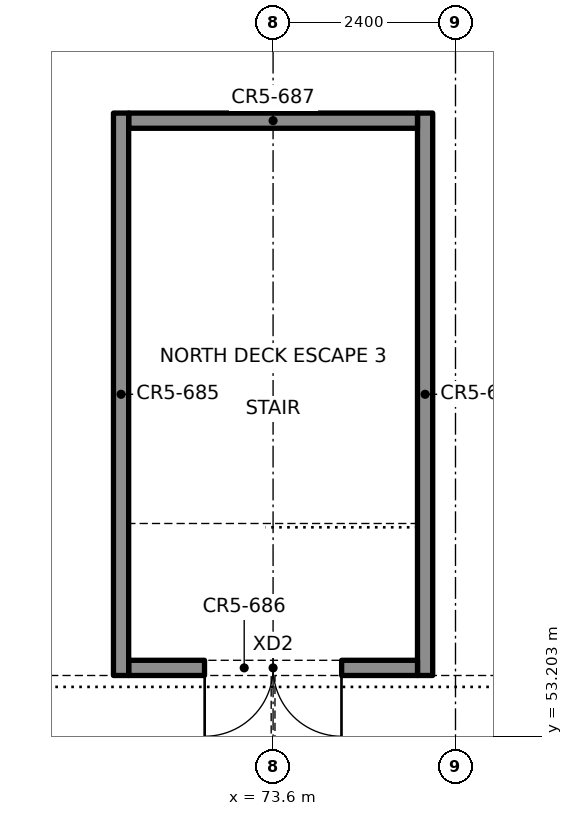
"""IFC4 building model, lengths in metres.
Left out: names, types, materials, properties, quantities, classifications, styles, units other than length and angle.
Written with IfcOpenShell. Run it as: python <this file> out.ifc"""

import sys

from ifc_helpers import new_model, si_unit, direction, frame, frame_2d, origin, place, context, subcontext, project, spatial, rectangle, extrude, element, fill, save


model = new_model("IFC4")
c1 = context("Model", 3, precision=1e-05, world=origin(), true_north=direction((0.0, 1.0)))
c2 = subcontext(c1, "Body", "Model", "MODEL_VIEW")
j1 = project(units=[si_unit("LENGTHUNIT", "METRE"), si_unit("PLANEANGLEUNIT", "RADIAN")], contexts=[c1])
p1 = place(None, origin())
s1 = spatial("IfcSite", under=j1, at=p1, CompositionType="ELEMENT")
p2 = place(p1, origin())
s2 = spatial("IfcBuilding", under=s1, at=p2, CompositionType="ELEMENT")
p3 = place(p2, frame((0.0, 0.0, 14.0)))
s3 = spatial("IfcBuildingStorey", under=s2, at=p3, CompositionType="ELEMENT", Elevation=14.0)
for number, where, z_axis, x_axis in (
    (1, (71.6, 54.0, 0.0), (0.0, 0.0, 1.0), (0.0, 1.0, 0.0)),
    (2, (75.6, 61.4, 0.0), (0.0, 0.0, 1.0), (0.0, -1.0, 0.0)),
):
    element("IfcWall", number, at=place(p3, frame(where, z_axis=z_axis, x_axis=x_axis)), inside=s3, PredefinedType="SOLIDWALL", context=c2, shape_type="SweptSolid", body=[
        extrude(rectangle(XDim=7.4, YDim=0.2, at=frame_2d((3.7, 0.0))), origin(), (0.0, 0.0, 1.0), 3.0),
    ])
p4 = place(p3, frame((71.7, 54.1, 0.0), z_axis=(0.0, 0.0, 1.0), x_axis=(1.0, 0.0, 0.0)))
e3 = element("IfcWall", 3, at=p4, inside=s3, PredefinedType="SOLIDWALL", context=c2, shape_type="SweptSolid", body=[
    extrude(rectangle(XDim=3.8, YDim=0.2, at=frame_2d((1.9, 0.0))), origin(), (0.0, 0.0, 1.0), 3.0),
])
p5 = place(p4, frame((1.0, 0.0, 0.0)))
e4 = element("IfcOpeningElement", 4, at=p5, cuts=e3, PredefinedType="OPENING", context=c2, shape_type="SweptSolid", body=[
    extrude(rectangle(XDim=1.8, YDim=2.1, at=frame_2d((0.9, 1.05))), frame((0.0, 0.11, 0.0), z_axis=(0.0, -1.0, 0.0), x_axis=(1.0, 0.0, 0.0)), (0.0, 0.0, 1.0), 0.22),
])
p6 = place(p3, frame((71.7, 61.3, 0.0), z_axis=(0.0, 0.0, 1.0), x_axis=(1.0, 0.0, 0.0)))
e5 = element("IfcWall", 5, at=p6, inside=s3, PredefinedType="SOLIDWALL", context=c2, shape_type="SweptSolid", body=[
    extrude(rectangle(XDim=3.8, YDim=0.2, at=frame_2d((1.9, 0.0))), origin(), (0.0, 0.0, 1.0), 3.0),
])
p7 = place(p5, origin())
e6 = element("IfcDoor", 6, at=p7, inside=s3, OperationType="DOUBLE_DOOR_SINGLE_SWING", PredefinedType="DOOR", context=c2, shape_type="SweptSolid", body=[
    extrude(rectangle(XDim=1.8, YDim=2.1, at=frame_2d((0.9, 1.05))), frame((0.0, 0.025, 0.0), z_axis=(0.0, -1.0, 0.0), x_axis=(1.0, 0.0, 0.0)), (0.0, 0.0, 1.0), 0.05),
])
fill(e4, e6)
save(model, sys.argv[1])
